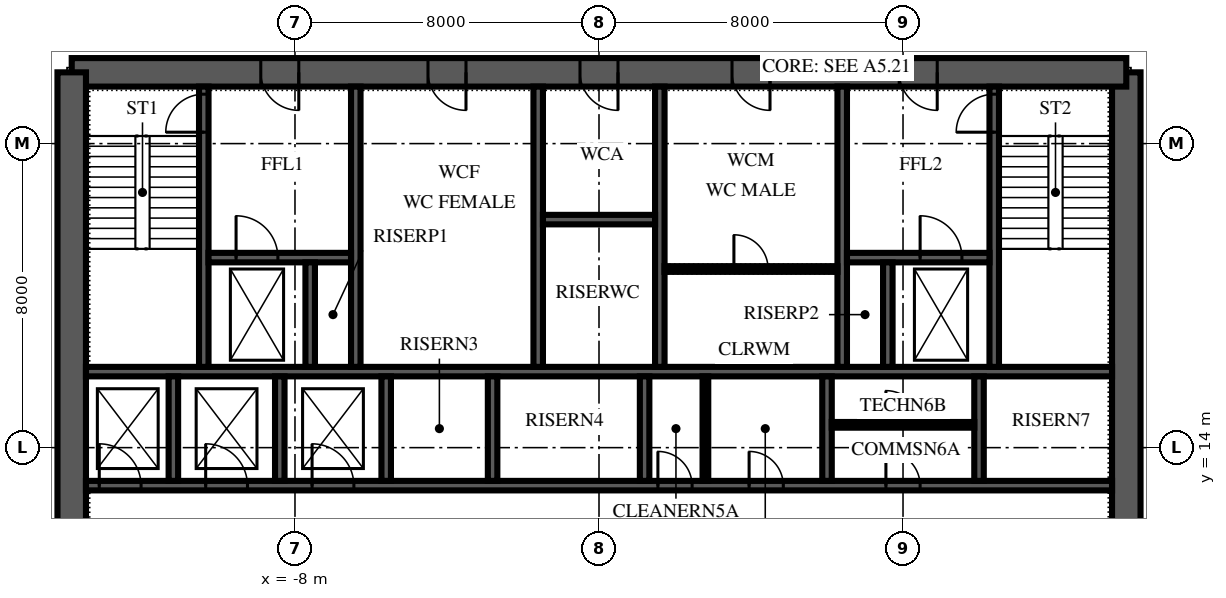
"""IFC4 building model, lengths in metres.
Left out: names, types, materials, properties, quantities, classifications, styles, units other than length and angle.
Written with IfcOpenShell. Run it as: python <this file> out.ifc"""

import sys

from ifc_helpers import new_model, si_unit, direction, frame, frame_2d, origin, place, context, subcontext, project, spatial, polyline, rectangle, outline, extrude, element, fill, save


model = new_model("IFC4")
c1 = context("Model", 3, precision=1e-05, world=origin(), true_north=direction((0.0, 1.0)))
c2 = subcontext(c1, "Body", "Model", "MODEL_VIEW")
j1 = project(units=[si_unit("LENGTHUNIT", "METRE"), si_unit("PLANEANGLEUNIT", "RADIAN")], contexts=[c1])
p1 = place(None, origin())
s1 = spatial("IfcSite", under=j1, at=p1, CompositionType="ELEMENT")
p2 = place(p1, origin())
s2 = spatial("IfcBuilding", under=s1, at=p2, CompositionType="ELEMENT")
p3 = place(p2, frame((0.0, 0.0, 151.0)))
s3 = spatial("IfcBuildingStorey", under=s2, at=p3, CompositionType="ELEMENT", Elevation=151.0)
p4 = place(p3, frame((13.875, 6.125, 0.0), z_axis=(0.0, 0.0, 1.0), x_axis=(0.0, 1.0, 0.0)))
e1 = element("IfcWall", 1, at=p4, inside=s3, PredefinedType="SHEAR", context=c2, shape_type="SweptSolid", body=[
    extrude(outline(polyline([(0.0, -0.375), (17.75, -0.375), (17.75, 0.0), (17.375, 0.0), (17.375, 0.375), (0.375, 0.375), (0.375, 0.0), (0.0, 0.0), (0.0, -0.375)])), origin(), (0.0, 0.0, 1.0), 4.0),
])
p5 = place(p4, frame((4.175, 0.0, 0.0)))
e2 = element("IfcOpeningElement", 2, at=p5, cuts=e1, PredefinedType="OPENING", context=c2, shape_type="SweptSolid", body=[
    extrude(rectangle(XDim=1.8, YDim=2.4, at=frame_2d((0.9, 1.2))), frame((0.0, 0.39, 0.0), z_axis=(0.0, -1.0, 0.0), x_axis=(1.0, 0.0, 0.0)), (0.0, 0.0, 1.0), 0.78),
])
p6 = place(p3, frame((13.875, 23.875, 0.0), z_axis=(0.0, 0.0, 1.0), x_axis=(-1.0, 0.0, 0.0)))
e3 = element("IfcWall", 3, at=p6, inside=s3, PredefinedType="SHEAR", context=c2, shape_type="SweptSolid", body=[
    extrude(rectangle(XDim=27.75, YDim=0.75, at=frame_2d((13.875, 0.0))), origin(), (0.0, 0.0, 1.0), 4.0),
])
p7 = place(p6, frame((21.775, 0.0, 0.0)))
e4 = element("IfcOpeningElement", 4, at=p7, cuts=e3, PredefinedType="OPENING", context=c2, shape_type="SweptSolid", body=[
    extrude(rectangle(XDim=1.0, YDim=2.1, at=frame_2d((0.5, 1.05))), frame((0.0, 0.39, 0.0), z_axis=(0.0, -1.0, 0.0), x_axis=(1.0, 0.0, 0.0)), (0.0, 0.0, 1.0), 0.78),
])
p8 = place(p6, frame((4.975, 0.0, 0.0)))
e5 = element("IfcOpeningElement", 5, at=p8, cuts=e3, PredefinedType="OPENING", context=c2, shape_type="SweptSolid", body=[
    extrude(rectangle(XDim=1.0, YDim=2.1, at=frame_2d((0.5, 1.05))), frame((0.0, 0.39, 0.0), z_axis=(0.0, -1.0, 0.0), x_axis=(1.0, 0.0, 0.0)), (0.0, 0.0, 1.0), 0.78),
])
p9 = place(p6, frame((17.375, 0.0, 0.0)))
e6 = element("IfcOpeningElement", 6, at=p9, cuts=e3, PredefinedType="OPENING", context=c2, shape_type="SweptSolid", body=[
    extrude(rectangle(XDim=1.0, YDim=2.1, at=frame_2d((0.5, 1.05))), frame((0.0, 0.39, 0.0), z_axis=(0.0, -1.0, 0.0), x_axis=(1.0, 0.0, 0.0)), (0.0, 0.0, 1.0), 0.78),
])
p10 = place(p6, frame((13.375, 0.0, 0.0)))
e7 = element("IfcOpeningElement", 7, at=p10, cuts=e3, PredefinedType="OPENING", context=c2, shape_type="SweptSolid", body=[
    extrude(rectangle(XDim=1.0, YDim=2.1, at=frame_2d((0.5, 1.05))), frame((0.0, 0.39, 0.0), z_axis=(0.0, -1.0, 0.0), x_axis=(1.0, 0.0, 0.0)), (0.0, 0.0, 1.0), 0.78),
])
p11 = place(p6, frame((9.375, 0.0, 0.0)))
e8 = element("IfcOpeningElement", 8, at=p11, cuts=e3, PredefinedType="OPENING", context=c2, shape_type="SweptSolid", body=[
    extrude(rectangle(XDim=1.0, YDim=2.1, at=frame_2d((0.5, 1.05))), frame((0.0, 0.39, 0.0), z_axis=(0.0, -1.0, 0.0), x_axis=(1.0, 0.0, 0.0)), (0.0, 0.0, 1.0), 0.78),
])
p12 = place(p3, frame((-13.875, 23.875, 0.0), z_axis=(0.0, 0.0, 1.0), x_axis=(0.0, -1.0, 0.0)))
e9 = element("IfcWall", 9, at=p12, inside=s3, PredefinedType="SHEAR", context=c2, shape_type="SweptSolid", body=[
    extrude(outline(polyline([(0.0, -0.375), (17.75, -0.375), (17.75, 0.0), (17.375, 0.0), (17.375, 0.375), (0.375, 0.375), (0.375, 0.0), (0.0, 0.0), (0.0, -0.375)])), origin(), (0.0, 0.0, 1.0), 4.0),
])
p13 = place(p12, frame((11.775, 0.0, 0.0)))
e10 = element("IfcOpeningElement", 10, at=p13, cuts=e9, PredefinedType="OPENING", context=c2, shape_type="SweptSolid", body=[
    extrude(rectangle(XDim=1.8, YDim=2.4, at=frame_2d((0.9, 1.2))), frame((0.0, 0.39, 0.0), z_axis=(0.0, -1.0, 0.0), x_axis=(1.0, 0.0, 0.0)), (0.0, 0.0, 1.0), 0.78),
])
p14 = place(p3, frame((-13.5, 13.0, 0.0), z_axis=(0.0, 0.0, 1.0), x_axis=(1.0, 0.0, 0.0)))
e11 = element("IfcWall", 11, at=p14, inside=s3, PredefinedType="SHEAR", context=c2, shape_type="SweptSolid", body=[
    extrude(rectangle(XDim=27.0, YDim=0.25, at=frame_2d((13.5, 0.0))), origin(), (0.0, 0.0, 1.0), 4.0),
])
p15 = place(p14, frame((0.35, 0.0, 0.0)))
e12 = element("IfcOpeningElement", 12, at=p15, cuts=e11, PredefinedType="OPENING", context=c2, shape_type="SweptSolid", body=[
    extrude(rectangle(XDim=1.1, YDim=2.1, at=frame_2d((0.55, 1.05))), frame((0.0, 0.14, 0.0), z_axis=(0.0, -1.0, 0.0), x_axis=(1.0, 0.0, 0.0)), (0.0, 0.0, 1.0), 0.28),
])
p16 = place(p14, frame((3.15, 0.0, 0.0)))
e13 = element("IfcOpeningElement", 13, at=p16, cuts=e11, PredefinedType="OPENING", context=c2, shape_type="SweptSolid", body=[
    extrude(rectangle(XDim=1.1, YDim=2.1, at=frame_2d((0.55, 1.05))), frame((0.0, 0.14, 0.0), z_axis=(0.0, -1.0, 0.0), x_axis=(1.0, 0.0, 0.0)), (0.0, 0.0, 1.0), 0.28),
])
p17 = place(p14, frame((5.95, 0.0, 0.0)))
e14 = element("IfcOpeningElement", 14, at=p17, cuts=e11, PredefinedType="OPENING", context=c2, shape_type="SweptSolid", body=[
    extrude(rectangle(XDim=1.1, YDim=2.1, at=frame_2d((0.55, 1.05))), frame((0.0, 0.14, 0.0), z_axis=(0.0, -1.0, 0.0), x_axis=(1.0, 0.0, 0.0)), (0.0, 0.0, 1.0), 0.28),
])
p18 = place(p14, frame((15.05, 0.0, 0.0)))
e15 = element("IfcOpeningElement", 15, at=p18, cuts=e11, PredefinedType="OPENING", context=c2, shape_type="SweptSolid", body=[
    extrude(rectangle(XDim=0.9, YDim=2.1, at=frame_2d((0.45, 1.05))), frame((0.0, 0.14, 0.0), z_axis=(0.0, -1.0, 0.0), x_axis=(1.0, 0.0, 0.0)), (0.0, 0.0, 1.0), 0.28),
])
p19 = place(p14, frame((17.45, 0.0, 0.0)))
e16 = element("IfcOpeningElement", 16, at=p19, cuts=e11, PredefinedType="OPENING", context=c2, shape_type="SweptSolid", body=[
    extrude(rectangle(XDim=0.9, YDim=2.1, at=frame_2d((0.45, 1.05))), frame((0.0, 0.14, 0.0), z_axis=(0.0, -1.0, 0.0), x_axis=(1.0, 0.0, 0.0)), (0.0, 0.0, 1.0), 0.28),
])
p20 = place(p14, frame((21.05, 0.0, 0.0)))
e17 = element("IfcOpeningElement", 17, at=p20, cuts=e11, PredefinedType="OPENING", context=c2, shape_type="SweptSolid", body=[
    extrude(rectangle(XDim=0.9, YDim=2.1, at=frame_2d((0.45, 1.05))), frame((0.0, 0.14, 0.0), z_axis=(0.0, -1.0, 0.0), x_axis=(1.0, 0.0, 0.0)), (0.0, 0.0, 1.0), 0.28),
])
p21 = place(p3, frame((-13.5, 16.0, 0.0), z_axis=(0.0, 0.0, 1.0), x_axis=(1.0, 0.0, 0.0)))
e18 = element("IfcWall", 18, at=p21, inside=s3, PredefinedType="SHEAR", context=c2, shape_type="SweptSolid", body=[
    extrude(rectangle(XDim=27.0, YDim=0.25, at=frame_2d((13.5, 0.0))), origin(), (0.0, 0.0, 1.0), 4.0),
])
for number, where, z_axis, x_axis in (
    (19, (-11.2, 13.125, 0.0), (0.0, 0.0, 1.0), (0.0, 1.0, 0.0)),
    (20, (-8.4, 13.125, 0.0), (0.0, 0.0, 1.0), (0.0, 1.0, 0.0)),
    (21, (-5.6, 13.125, 0.0), (0.0, 0.0, 1.0), (0.0, 1.0, 0.0)),
    (22, (-2.8, 13.125, 0.0), (0.0, 0.0, 1.0), (0.0, 1.0, 0.0)),
    (23, (1.2, 13.125, 0.0), (0.0, 0.0, 1.0), (0.0, 1.0, 0.0)),
    (24, (6.0, 13.125, 0.0), (0.0, 0.0, 1.0), (0.0, 1.0, 0.0)),
    (25, (10.0, 13.125, 0.0), (0.0, 0.0, 1.0), (0.0, 1.0, 0.0)),
):
    element("IfcWall", number, at=place(p3, frame(where, z_axis=z_axis, x_axis=x_axis)), inside=s3, PredefinedType="SHEAR", context=c2, shape_type="SweptSolid", body=[
        extrude(rectangle(XDim=2.75, YDim=0.25, at=frame_2d((1.375, 0.0))), origin(), (0.0, 0.0, 1.0), 4.0),
    ])
p22 = place(p3, frame((-10.4, 16.125, 0.0), z_axis=(0.0, 0.0, 1.0), x_axis=(0.0, 1.0, 0.0)))
e26 = element("IfcWall", 26, at=p22, inside=s3, PredefinedType="SHEAR", context=c2, shape_type="SweptSolid", body=[
    extrude(rectangle(XDim=7.375, YDim=0.25, at=frame_2d((3.688, 0.0))), origin(), (0.0, 0.0, 1.0), 4.0),
])
p23 = place(p22, frame((6.175, 0.0, 0.0)))
e27 = element("IfcOpeningElement", 27, at=p23, cuts=e26, PredefinedType="OPENING", context=c2, shape_type="SweptSolid", body=[
    extrude(rectangle(XDim=1.0, YDim=2.1, at=frame_2d((0.5, 1.05))), frame((0.0, 0.14, 0.0), z_axis=(0.0, -1.0, 0.0), x_axis=(1.0, 0.0, 0.0)), (0.0, 0.0, 1.0), 0.28),
])
for number, where, z_axis, x_axis in (
    (28, (-6.4, 16.125, 0.0), (0.0, 0.0, 1.0), (0.0, 1.0, 0.0)),
    (29, (-1.6, 16.125, 0.0), (0.0, 0.0, 1.0), (0.0, 1.0, 0.0)),
    (30, (1.6, 16.125, 0.0), (0.0, 0.0, 1.0), (0.0, 1.0, 0.0)),
    (31, (6.4, 16.125, 0.0), (0.0, 0.0, 1.0), (0.0, 1.0, 0.0)),
):
    element("IfcWall", number, at=place(p3, frame(where, z_axis=z_axis, x_axis=x_axis)), inside=s3, PredefinedType="SHEAR", context=c2, shape_type="SweptSolid", body=[
        extrude(rectangle(XDim=7.375, YDim=0.25, at=frame_2d((3.688, 0.0))), origin(), (0.0, 0.0, 1.0), 4.0),
    ])
p24 = place(p3, frame((10.4, 16.125, 0.0), z_axis=(0.0, 0.0, 1.0), x_axis=(0.0, 1.0, 0.0)))
e32 = element("IfcWall", 32, at=p24, inside=s3, PredefinedType="SHEAR", context=c2, shape_type="SweptSolid", body=[
    extrude(rectangle(XDim=7.375, YDim=0.25, at=frame_2d((3.688, 0.0))), origin(), (0.0, 0.0, 1.0), 4.0),
])
p25 = place(p24, frame((6.175, 0.0, 0.0)))
e33 = element("IfcOpeningElement", 33, at=p25, cuts=e32, PredefinedType="OPENING", context=c2, shape_type="SweptSolid", body=[
    extrude(rectangle(XDim=1.0, YDim=2.1, at=frame_2d((0.5, 1.05))), frame((0.0, 0.14, 0.0), z_axis=(0.0, -1.0, 0.0), x_axis=(1.0, 0.0, 0.0)), (0.0, 0.0, 1.0), 0.28),
])
p26 = place(p3, frame((-10.275, 19.0, 0.0), z_axis=(0.0, 0.0, 1.0), x_axis=(1.0, 0.0, 0.0)))
e34 = element("IfcWall", 34, at=p26, inside=s3, PredefinedType="SHEAR", context=c2, shape_type="SweptSolid", body=[
    extrude(rectangle(XDim=3.75, YDim=0.25, at=frame_2d((1.875, 0.0))), origin(), (0.0, 0.0, 1.0), 4.0),
])
p27 = place(p26, frame((0.725, 0.0, 0.0)))
e35 = element("IfcOpeningElement", 35, at=p27, cuts=e34, PredefinedType="OPENING", context=c2, shape_type="SweptSolid", body=[
    extrude(rectangle(XDim=1.1, YDim=2.1, at=frame_2d((0.55, 1.05))), frame((0.0, 0.14, 0.0), z_axis=(0.0, -1.0, 0.0), x_axis=(1.0, 0.0, 0.0)), (0.0, 0.0, 1.0), 0.28),
])
p28 = place(p3, frame((6.525, 19.0, 0.0), z_axis=(0.0, 0.0, 1.0), x_axis=(1.0, 0.0, 0.0)))
e36 = element("IfcWall", 36, at=p28, inside=s3, PredefinedType="SHEAR", context=c2, shape_type="SweptSolid", body=[
    extrude(rectangle(XDim=3.75, YDim=0.25, at=frame_2d((1.875, 0.0))), origin(), (0.0, 0.0, 1.0), 4.0),
])
p29 = place(p28, frame((1.925, 0.0, 0.0)))
e37 = element("IfcOpeningElement", 37, at=p29, cuts=e36, PredefinedType="OPENING", context=c2, shape_type="SweptSolid", body=[
    extrude(rectangle(XDim=1.1, YDim=2.1, at=frame_2d((0.55, 1.05))), frame((0.0, 0.14, 0.0), z_axis=(0.0, -1.0, 0.0), x_axis=(1.0, 0.0, 0.0)), (0.0, 0.0, 1.0), 0.28),
])
for number, where, z_axis, x_axis in (
    (38, (-7.6, 16.125, 0.0), (0.0, 0.0, 1.0), (0.0, 1.0, 0.0)),
    (39, (7.6, 16.125, 0.0), (0.0, 0.0, 1.0), (0.0, 1.0, 0.0)),
):
    element("IfcWall", number, at=place(p3, frame(where, z_axis=z_axis, x_axis=x_axis)), inside=s3, PredefinedType="SHEAR", context=c2, shape_type="SweptSolid", body=[
        extrude(rectangle(XDim=2.75, YDim=0.25, at=frame_2d((1.375, 0.0))), origin(), (0.0, 0.0, 1.0), 4.0),
    ])
p30 = place(p3, frame((-1.475, 20.0, 0.0), z_axis=(0.0, 0.0, 1.0), x_axis=(1.0, 0.0, 0.0)))
e40 = element("IfcWall", 40, at=p30, inside=s3, PredefinedType="SHEAR", context=c2, shape_type="SweptSolid", body=[
    extrude(rectangle(XDim=2.95, YDim=0.25, at=frame_2d((1.475, 0.0))), origin(), (0.0, 0.0, 1.0), 4.0),
])
p31 = place(p3, frame((1.725, 18.7, 0.0), z_axis=(0.0, 0.0, 1.0), x_axis=(1.0, 0.0, 0.0)))
e41 = element("IfcWall", 41, at=p31, inside=s3, PredefinedType="PARTITIONING", context=c2, shape_type="SweptSolid", body=[
    extrude(rectangle(XDim=4.55, YDim=0.15, at=frame_2d((2.275, 0.0))), origin(), (0.0, 0.0, 1.0), 3.85),
])
p32 = place(p31, frame((1.825, 0.0, 0.0)))
e42 = element("IfcOpeningElement", 42, at=p32, cuts=e41, PredefinedType="OPENING", context=c2, shape_type="SweptSolid", body=[
    extrude(rectangle(XDim=0.9, YDim=2.1, at=frame_2d((0.45, 1.05))), frame((0.0, 0.09, 0.0), z_axis=(0.0, -1.0, 0.0), x_axis=(1.0, 0.0, 0.0)), (0.0, 0.0, 1.0), 0.18),
])
p33 = place(p3, frame((2.8, 13.125, 0.0), z_axis=(0.0, 0.0, 1.0), x_axis=(0.0, 1.0, 0.0)))
e43 = element("IfcWall", 43, at=p33, inside=s3, PredefinedType="PARTITIONING", context=c2, shape_type="SweptSolid", body=[
    extrude(rectangle(XDim=2.75, YDim=0.15, at=frame_2d((1.375, 0.0))), origin(), (0.0, 0.0, 1.0), 3.85),
])
p34 = place(p3, frame((6.125, 14.6, 0.0), z_axis=(0.0, 0.0, 1.0), x_axis=(1.0, 0.0, 0.0)))
e44 = element("IfcWall", 44, at=p34, inside=s3, PredefinedType="PARTITIONING", context=c2, shape_type="SweptSolid", body=[
    extrude(rectangle(XDim=3.75, YDim=0.15, at=frame_2d((1.875, 0.0))), origin(), (0.0, 0.0, 1.0), 3.85),
])
p35 = place(p34, frame((1.425, 0.0, 0.0)))
e45 = element("IfcOpeningElement", 45, at=p35, cuts=e44, PredefinedType="OPENING", context=c2, shape_type="SweptSolid", body=[
    extrude(rectangle(XDim=0.9, YDim=2.1, at=frame_2d((0.45, 1.05))), frame((0.0, 0.09, 0.0), z_axis=(0.0, -1.0, 0.0), x_axis=(1.0, 0.0, 0.0)), (0.0, 0.0, 1.0), 0.18),
])
p36 = place(p7, origin())
e46 = element("IfcDoor", 46, at=p36, inside=s3, OperationType="SINGLE_SWING_RIGHT", PredefinedType="DOOR", context=c2, shape_type="SweptSolid", body=[
    extrude(rectangle(XDim=1.0, YDim=2.1, at=frame_2d((0.5, 1.05))), frame((0.0, 0.375, 0.0), z_axis=(0.0, -1.0, 0.0), x_axis=(1.0, 0.0, 0.0)), (0.0, 0.0, 1.0), 0.75),
])
fill(e4, e46)
p37 = place(p8, origin())
e47 = element("IfcDoor", 47, at=p37, inside=s3, OperationType="SINGLE_SWING_RIGHT", PredefinedType="DOOR", context=c2, shape_type="SweptSolid", body=[
    extrude(rectangle(XDim=1.0, YDim=2.1, at=frame_2d((0.5, 1.05))), frame((0.0, 0.375, 0.0), z_axis=(0.0, -1.0, 0.0), x_axis=(1.0, 0.0, 0.0)), (0.0, 0.0, 1.0), 0.75),
])
fill(e5, e47)
p38 = place(p9, origin())
e48 = element("IfcDoor", 48, at=p38, inside=s3, OperationType="SINGLE_SWING_LEFT", PredefinedType="DOOR", context=c2, shape_type="SweptSolid", body=[
    extrude(rectangle(XDim=1.0, YDim=2.1, at=frame_2d((0.5, 1.05))), frame((0.0, 0.375, 0.0), z_axis=(0.0, -1.0, 0.0), x_axis=(1.0, 0.0, 0.0)), (0.0, 0.0, 1.0), 0.75),
])
fill(e6, e48)
p39 = place(p10, origin())
e49 = element("IfcDoor", 49, at=p39, inside=s3, OperationType="SINGLE_SWING_LEFT", PredefinedType="DOOR", context=c2, shape_type="SweptSolid", body=[
    extrude(rectangle(XDim=1.0, YDim=2.1, at=frame_2d((0.5, 1.05))), frame((0.0, 0.375, 0.0), z_axis=(0.0, -1.0, 0.0), x_axis=(1.0, 0.0, 0.0)), (0.0, 0.0, 1.0), 0.75),
])
fill(e7, e49)
p40 = place(p11, origin())
e50 = element("IfcDoor", 50, at=p40, inside=s3, OperationType="SINGLE_SWING_LEFT", PredefinedType="DOOR", context=c2, shape_type="SweptSolid", body=[
    extrude(rectangle(XDim=1.0, YDim=2.1, at=frame_2d((0.5, 1.05))), frame((0.0, 0.375, 0.0), z_axis=(0.0, -1.0, 0.0), x_axis=(1.0, 0.0, 0.0)), (0.0, 0.0, 1.0), 0.75),
])
fill(e8, e50)
p41 = place(p23, origin())
e51 = element("IfcDoor", 51, at=p41, inside=s3, OperationType="SINGLE_SWING_LEFT", PredefinedType="DOOR", context=c2, shape_type="SweptSolid", body=[
    extrude(rectangle(XDim=1.0, YDim=2.1, at=frame_2d((0.5, 1.05))), frame((0.0, 0.125, 0.0), z_axis=(0.0, -1.0, 0.0), x_axis=(1.0, 0.0, 0.0)), (0.0, 0.0, 1.0), 0.25),
])
fill(e27, e51)
p42 = place(p25, origin())
e52 = element("IfcDoor", 52, at=p42, inside=s3, OperationType="SINGLE_SWING_LEFT", PredefinedType="DOOR", context=c2, shape_type="SweptSolid", body=[
    extrude(rectangle(XDim=1.0, YDim=2.1, at=frame_2d((0.5, 1.05))), frame((0.0, 0.125, 0.0), z_axis=(0.0, -1.0, 0.0), x_axis=(1.0, 0.0, 0.0)), (0.0, 0.0, 1.0), 0.25),
])
fill(e33, e52)
p43 = place(p15, origin())
e53 = element("IfcDoor", 53, at=p43, inside=s3, OperationType="SLIDING_TO_LEFT", PredefinedType="DOOR", context=c2, shape_type="SweptSolid", body=[
    extrude(rectangle(XDim=1.1, YDim=2.1, at=frame_2d((0.55, 1.05))), frame((0.0, 0.125, 0.0), z_axis=(0.0, -1.0, 0.0), x_axis=(1.0, 0.0, 0.0)), (0.0, 0.0, 1.0), 0.25),
])
fill(e12, e53)
p44 = place(p16, origin())
e54 = element("IfcDoor", 54, at=p44, inside=s3, OperationType="SLIDING_TO_LEFT", PredefinedType="DOOR", context=c2, shape_type="SweptSolid", body=[
    extrude(rectangle(XDim=1.1, YDim=2.1, at=frame_2d((0.55, 1.05))), frame((0.0, 0.125, 0.0), z_axis=(0.0, -1.0, 0.0), x_axis=(1.0, 0.0, 0.0)), (0.0, 0.0, 1.0), 0.25),
])
fill(e13, e54)
p45 = place(p17, origin())
e55 = element("IfcDoor", 55, at=p45, inside=s3, OperationType="SLIDING_TO_LEFT", PredefinedType="DOOR", context=c2, shape_type="SweptSolid", body=[
    extrude(rectangle(XDim=1.1, YDim=2.1, at=frame_2d((0.55, 1.05))), frame((0.0, 0.125, 0.0), z_axis=(0.0, -1.0, 0.0), x_axis=(1.0, 0.0, 0.0)), (0.0, 0.0, 1.0), 0.25),
])
fill(e14, e55)
p46 = place(p29, origin())
e56 = element("IfcDoor", 56, at=p46, inside=s3, OperationType="SLIDING_TO_RIGHT", PredefinedType="DOOR", context=c2, shape_type="SweptSolid", body=[
    extrude(rectangle(XDim=1.1, YDim=2.1, at=frame_2d((0.55, 1.05))), frame((0.0, 0.125, 0.0), z_axis=(0.0, -1.0, 0.0), x_axis=(1.0, 0.0, 0.0)), (0.0, 0.0, 1.0), 0.25),
])
fill(e37, e56)
p47 = place(p27, origin())
e57 = element("IfcDoor", 57, at=p47, inside=s3, OperationType="SLIDING_TO_RIGHT", PredefinedType="DOOR", context=c2, shape_type="SweptSolid", body=[
    extrude(rectangle(XDim=1.1, YDim=2.1, at=frame_2d((0.55, 1.05))), frame((0.0, 0.125, 0.0), z_axis=(0.0, -1.0, 0.0), x_axis=(1.0, 0.0, 0.0)), (0.0, 0.0, 1.0), 0.25),
])
fill(e35, e57)
p48 = place(p18, origin())
e58 = element("IfcDoor", 58, at=p48, inside=s3, OperationType="SINGLE_SWING_LEFT", PredefinedType="DOOR", context=c2, shape_type="SweptSolid", body=[
    extrude(rectangle(XDim=0.9, YDim=2.1, at=frame_2d((0.45, 1.05))), frame((0.0, 0.125, 0.0), z_axis=(0.0, -1.0, 0.0), x_axis=(1.0, 0.0, 0.0)), (0.0, 0.0, 1.0), 0.25),
])
fill(e15, e58)
p49 = place(p19, origin())
e59 = element("IfcDoor", 59, at=p49, inside=s3, OperationType="SINGLE_SWING_LEFT", PredefinedType="DOOR", context=c2, shape_type="SweptSolid", body=[
    extrude(rectangle(XDim=0.9, YDim=2.1, at=frame_2d((0.45, 1.05))), frame((0.0, 0.125, 0.0), z_axis=(0.0, -1.0, 0.0), x_axis=(1.0, 0.0, 0.0)), (0.0, 0.0, 1.0), 0.25),
])
fill(e16, e59)
p50 = place(p20, origin())
e60 = element("IfcDoor", 60, at=p50, inside=s3, OperationType="SINGLE_SWING_LEFT", PredefinedType="DOOR", context=c2, shape_type="SweptSolid", body=[
    extrude(rectangle(XDim=0.9, YDim=2.1, at=frame_2d((0.45, 1.05))), frame((0.0, 0.125, 0.0), z_axis=(0.0, -1.0, 0.0), x_axis=(1.0, 0.0, 0.0)), (0.0, 0.0, 1.0), 0.25),
])
fill(e17, e60)
p51 = place(p35, origin())
e61 = element("IfcDoor", 61, at=p51, inside=s3, OperationType="SINGLE_SWING_LEFT", PredefinedType="DOOR", context=c2, shape_type="SweptSolid", body=[
    extrude(rectangle(XDim=0.9, YDim=2.1, at=frame_2d((0.45, 1.05))), frame((0.0, 0.075, 0.0), z_axis=(0.0, -1.0, 0.0), x_axis=(1.0, 0.0, 0.0)), (0.0, 0.0, 1.0), 0.149),
])
fill(e45, e61)
p52 = place(p32, origin())
e62 = element("IfcDoor", 62, at=p52, inside=s3, OperationType="SINGLE_SWING_LEFT", PredefinedType="DOOR", context=c2, shape_type="SweptSolid", body=[
    extrude(rectangle(XDim=0.9, YDim=2.1, at=frame_2d((0.45, 1.05))), frame((0.0, 0.075, 0.0), z_axis=(0.0, -1.0, 0.0), x_axis=(1.0, 0.0, 0.0)), (0.0, 0.0, 1.0), 0.149),
])
fill(e42, e62)
save(model, sys.argv[1])
